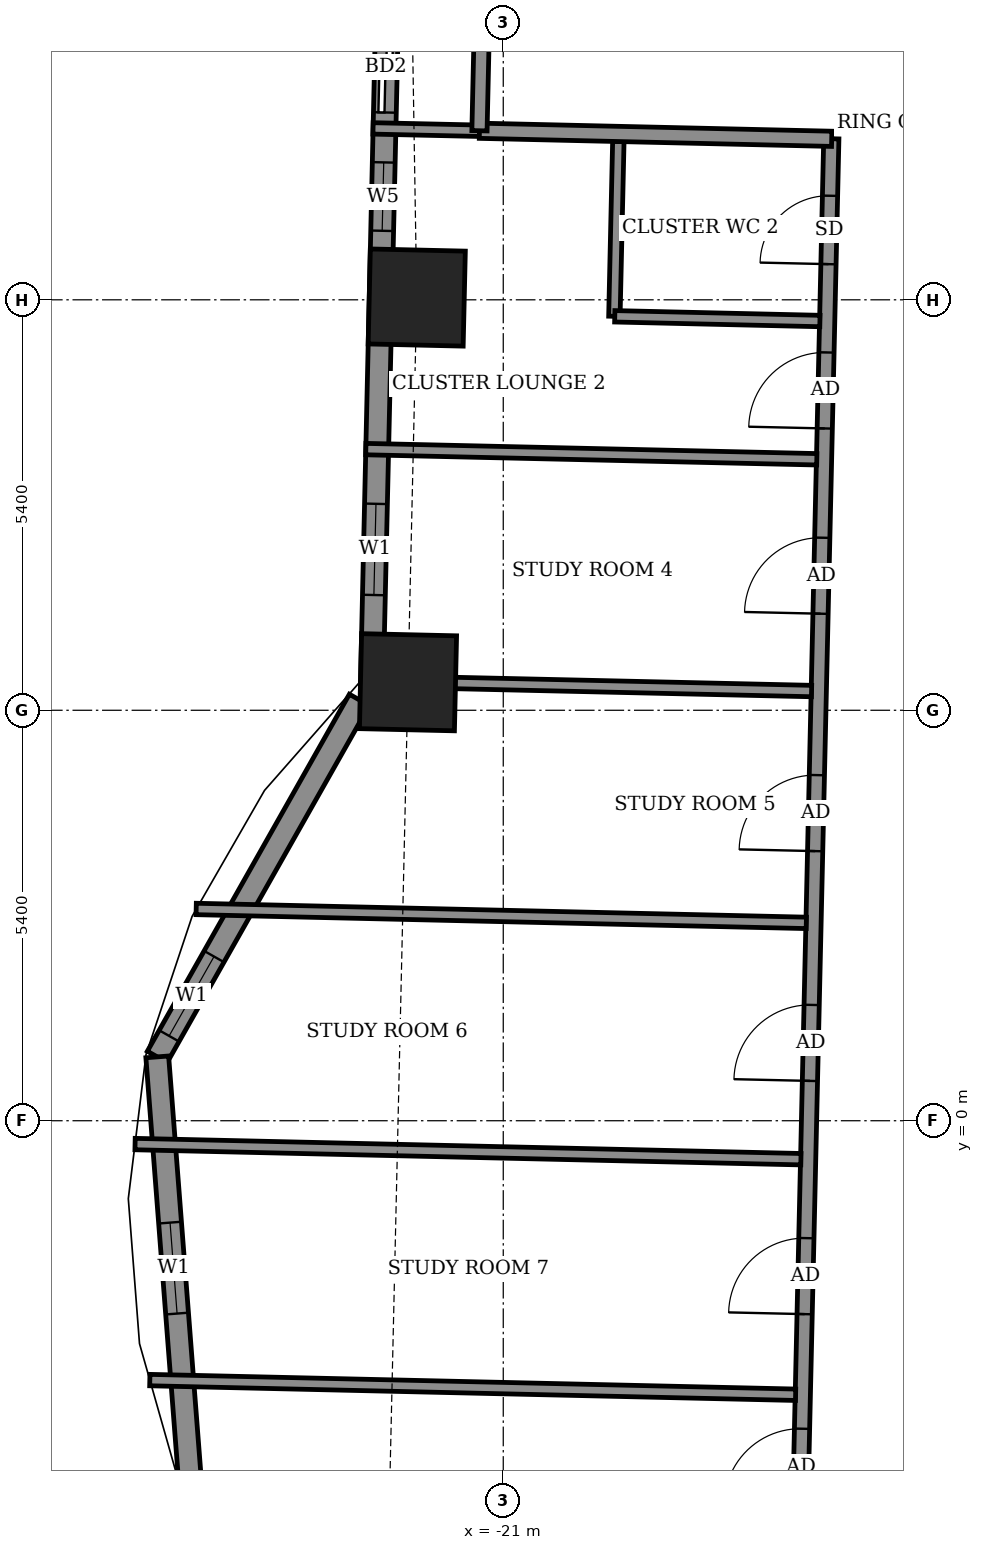
"""IFC4 building model, lengths in metres.
Left out: names, types, materials, properties, quantities, classifications, styles, units other than length and angle.
Written with IfcOpenShell. Run it as: python <this file> out.ifc"""

import sys

from ifc_helpers import new_model, si_unit, direction, frame, frame_2d, origin, origin_2d, place, context, subcontext, project, spatial, rectangle, extrude, element, fill, save


model = new_model("IFC4")
c1 = context("Model", 3, precision=1e-05, world=origin(), true_north=direction((0.0, 1.0)))
c2 = subcontext(c1, "Body", "Model", "MODEL_VIEW")
j1 = project(units=[si_unit("LENGTHUNIT", "METRE"), si_unit("PLANEANGLEUNIT", "RADIAN")], contexts=[c1])
p1 = place(None, origin())
s1 = spatial("IfcSite", under=j1, at=p1, CompositionType="ELEMENT")
p2 = place(p1, origin())
s2 = spatial("IfcBuilding", under=s1, at=p2, CompositionType="ELEMENT")
p3 = place(p2, frame((0.0, 0.0, 152.7)))
s3 = spatial("IfcBuildingStorey", under=s2, at=p3, CompositionType="ELEMENT", Elevation=152.7)
for number, where, z_axis, x_axis in (
    (1, (-22.138, 10.83, -0.55), (0.0, 0.0, 1.0), (-0.023, -1.0, 0.0)),
    (2, (-22.253, 5.769, -0.55), (0.0, 0.0, 1.0), (-0.023, -1.0, 0.0)),
):
    element("IfcColumn", number, at=place(p3, frame(where, z_axis=z_axis, x_axis=x_axis)), inside=s3, PredefinedType="COLUMN", context=c2, shape_type="SweptSolid", body=[
        extrude(rectangle(XDim=1.25, YDim=1.25, at=origin_2d()), origin(), (0.0, 0.0, 1.0), 3.6),
    ])
p4 = place(p3, frame((-22.501, 15.751, 0.0), z_axis=(0.0, 0.0, 1.0), x_axis=(-0.022737995473, -0.999741458359, 0.0)))
e3 = element("IfcWall", 3, at=p4, inside=s3, PredefinedType="SOLIDWALL", context=c2, shape_type="SweptSolid", body=[
    extrude(rectangle(XDim=10.029, YDim=0.3, at=frame_2d((5.014, 0.0))), origin(), (0.0, 0.0, 1.0), 3.05),
])
p5 = place(p4, frame((1.287, 0.0, 0.0)))
e4 = element("IfcOpeningElement", 4, at=p5, cuts=e3, PredefinedType="OPENING", context=c2, shape_type="SweptSolid", body=[
    extrude(rectangle(XDim=1.2, YDim=2.4, at=frame_2d((0.6, 1.2))), frame((0.0, 0.16, 0.0), z_axis=(0.0, -1.0, 0.0), x_axis=(1.0, 0.0, 0.0)), (0.0, 0.0, 1.0), 0.32),
])
p6 = place(p4, frame((3.144, 0.0, 0.9)))
e5 = element("IfcOpeningElement", 5, at=p6, cuts=e3, PredefinedType="OPENING", context=c2, shape_type="SweptSolid", body=[
    extrude(rectangle(XDim=0.9, YDim=1.5, at=frame_2d((0.45, 0.75))), frame((0.0, 0.16, 0.0), z_axis=(0.0, -1.0, 0.0), x_axis=(1.0, 0.0, 0.0)), (0.0, 0.0, 1.0), 0.32),
])
p7 = place(p4, frame((7.637, 0.0, 0.9)))
e6 = element("IfcOpeningElement", 6, at=p7, cuts=e3, PredefinedType="OPENING", context=c2, shape_type="SweptSolid", body=[
    extrude(rectangle(XDim=1.2, YDim=1.5, at=frame_2d((0.6, 0.75))), frame((0.0, 0.16, 0.0), z_axis=(0.0, -1.0, 0.0), x_axis=(1.0, 0.0, 0.0)), (0.0, 0.0, 1.0), 0.32),
])
p8 = place(p3, frame((-22.894, 5.537, 0.0), z_axis=(0.0, 0.0, 1.0), x_axis=(-0.492495436053, -0.870315026566, 0.0)))
e7 = element("IfcWall", 7, at=p8, inside=s3, PredefinedType="SOLIDWALL", context=c2, shape_type="SweptSolid", body=[
    extrude(rectangle(XDim=5.397, YDim=0.3, at=frame_2d((2.698, 0.0))), origin(), (0.0, 0.0, 1.0), 3.05),
])
p9 = place(p8, frame((3.88, 0.0, 0.9)))
e8 = element("IfcOpeningElement", 8, at=p9, cuts=e7, PredefinedType="OPENING", context=c2, shape_type="SweptSolid", body=[
    extrude(rectangle(XDim=1.2, YDim=1.5, at=frame_2d((0.6, 0.75))), frame((0.0, 0.16, 0.0), z_axis=(0.0, -1.0, 0.0), x_axis=(1.0, 0.0, 0.0)), (0.0, 0.0, 1.0), 0.32),
])
p10 = place(p3, frame((-25.552, 0.84, 0.0), z_axis=(0.0, 0.0, 1.0), x_axis=(0.076961115238, -0.997034095075, 0.0)))
e9 = element("IfcWall", 9, at=p10, inside=s3, PredefinedType="SOLIDWALL", context=c2, shape_type="SweptSolid", body=[
    extrude(rectangle(XDim=5.574, YDim=0.3, at=frame_2d((2.787, 0.0))), origin(), (0.0, 0.0, 1.0), 3.05),
])
p11 = place(p10, frame((2.187, 0.0, 0.9)))
e10 = element("IfcOpeningElement", 10, at=p11, cuts=e9, PredefinedType="OPENING", context=c2, shape_type="SweptSolid", body=[
    extrude(rectangle(XDim=1.2, YDim=1.5, at=frame_2d((0.6, 0.75))), frame((0.0, 0.16, 0.0), z_axis=(0.0, -1.0, 0.0), x_axis=(1.0, 0.0, 0.0)), (0.0, 0.0, 1.0), 0.32),
])
p12 = place(p3, frame((-25.486, 6.092, 0.0), z_axis=(0.0, 0.0, 1.0), x_axis=(0.022744303924, 0.999741314861, 0.0)))
e11 = element("IfcWall", 11, at=p12, inside=s3, PredefinedType="USERDEFINED", context=c2, shape_type="SweptSolid", body=[
    extrude(rectangle(XDim=3.875, YDim=0.55, at=frame_2d((1.938, 0.0))), origin(), (0.0, 0.0, 1.0), 0.8),
])
p13 = place(p3, frame((-17.32, -15.098, 0.0), z_axis=(0.0, 0.0, 1.0), x_axis=(0.022694293906, 0.999742451346, 0.0)))
e12 = element("IfcWall", 12, at=p13, inside=s3, PredefinedType="PARTITIONING", context=c2, shape_type="SweptSolid", body=[
    extrude(rectangle(XDim=28.024, YDim=0.2, at=frame_2d((14.012, 0.0))), origin(), (0.0, 0.0, 1.0), 3.05),
])
p14 = place(p13, frame((24.212, 0.0, 0.0)))
e13 = element("IfcOpeningElement", 13, at=p14, cuts=e12, PredefinedType="OPENING", context=c2, shape_type="SweptSolid", body=[
    extrude(rectangle(XDim=1.0, YDim=2.1, at=frame_2d((0.5, 1.05))), frame((0.0, 0.11, 0.0), z_axis=(0.0, -1.0, 0.0), x_axis=(1.0, 0.0, 0.0)), (0.0, 0.0, 1.0), 0.22),
])
p15 = place(p13, frame((26.374, 0.0, 0.0)))
e14 = element("IfcOpeningElement", 14, at=p15, cuts=e12, PredefinedType="OPENING", context=c2, shape_type="SweptSolid", body=[
    extrude(rectangle(XDim=0.9, YDim=2.1, at=frame_2d((0.45, 1.05))), frame((0.0, 0.11, 0.0), z_axis=(0.0, -1.0, 0.0), x_axis=(1.0, 0.0, 0.0)), (0.0, 0.0, 1.0), 0.22),
])
p16 = place(p13, frame((21.774, 0.0, 0.0)))
e15 = element("IfcOpeningElement", 15, at=p16, cuts=e12, PredefinedType="OPENING", context=c2, shape_type="SweptSolid", body=[
    extrude(rectangle(XDim=1.0, YDim=2.1, at=frame_2d((0.5, 1.05))), frame((0.0, 0.11, 0.0), z_axis=(0.0, -1.0, 0.0), x_axis=(1.0, 0.0, 0.0)), (0.0, 0.0, 1.0), 0.22),
])
p17 = place(p13, frame((18.65, 0.0, 0.0)))
e16 = element("IfcOpeningElement", 16, at=p17, cuts=e12, PredefinedType="OPENING", context=c2, shape_type="SweptSolid", body=[
    extrude(rectangle(XDim=1.0, YDim=2.1, at=frame_2d((0.5, 1.05))), frame((0.0, 0.11, 0.0), z_axis=(0.0, -1.0, 0.0), x_axis=(1.0, 0.0, 0.0)), (0.0, 0.0, 1.0), 0.22),
])
p18 = place(p13, frame((15.626, 0.0, 0.0)))
e17 = element("IfcOpeningElement", 17, at=p18, cuts=e12, PredefinedType="OPENING", context=c2, shape_type="SweptSolid", body=[
    extrude(rectangle(XDim=1.0, YDim=2.1, at=frame_2d((0.5, 1.05))), frame((0.0, 0.11, 0.0), z_axis=(0.0, -1.0, 0.0), x_axis=(1.0, 0.0, 0.0)), (0.0, 0.0, 1.0), 0.22),
])
p19 = place(p13, frame((12.557, 0.0, 0.0)))
e18 = element("IfcOpeningElement", 18, at=p19, cuts=e12, PredefinedType="OPENING", context=c2, shape_type="SweptSolid", body=[
    extrude(rectangle(XDim=1.0, YDim=2.1, at=frame_2d((0.5, 1.05))), frame((0.0, 0.11, 0.0), z_axis=(0.0, -1.0, 0.0), x_axis=(1.0, 0.0, 0.0)), (0.0, 0.0, 1.0), 0.22),
])
p20 = place(p13, frame((10.049, 0.0, 0.0)))
e19 = element("IfcOpeningElement", 19, at=p20, cuts=e12, PredefinedType="OPENING", context=c2, shape_type="SweptSolid", body=[
    extrude(rectangle(XDim=1.0, YDim=2.1, at=frame_2d((0.5, 1.05))), frame((0.0, 0.11, 0.0), z_axis=(0.0, -1.0, 0.0), x_axis=(1.0, 0.0, 0.0)), (0.0, 0.0, 1.0), 0.22),
])
p21 = place(p13, frame((7.849, 0.0, 0.0)))
e20 = element("IfcOpeningElement", 20, at=p21, cuts=e12, PredefinedType="OPENING", context=c2, shape_type="SweptSolid", body=[
    extrude(rectangle(XDim=0.9, YDim=2.1, at=frame_2d((0.45, 1.05))), frame((0.0, 0.11, 0.0), z_axis=(0.0, -1.0, 0.0), x_axis=(1.0, 0.0, 0.0)), (0.0, 0.0, 1.0), 0.22),
])
p22 = place(p13, frame((4.199, 0.0, 0.0)))
e21 = element("IfcOpeningElement", 21, at=p22, cuts=e12, PredefinedType="OPENING", context=c2, shape_type="SweptSolid", body=[
    extrude(rectangle(XDim=1.0, YDim=2.1, at=frame_2d((0.5, 1.05))), frame((0.0, 0.11, 0.0), z_axis=(0.0, -1.0, 0.0), x_axis=(1.0, 0.0, 0.0)), (0.0, 0.0, 1.0), 0.22),
])
p23 = place(p13, frame((0.75, 0.0, 0.0)))
e22 = element("IfcOpeningElement", 22, at=p23, cuts=e12, PredefinedType="OPENING", context=c2, shape_type="SweptSolid", body=[
    extrude(rectangle(XDim=0.9, YDim=2.1, at=frame_2d((0.45, 1.05))), frame((0.0, 0.11, 0.0), z_axis=(0.0, -1.0, 0.0), x_axis=(1.0, 0.0, 0.0)), (0.0, 0.0, 1.0), 0.22),
])
p24 = place(p3, frame((-25.65, -3.412, 0.0), z_axis=(0.0, 0.0, 1.0), x_axis=(0.999742413658, -0.022695954102, 0.0)))
e23 = element("IfcWall", 23, at=p24, inside=s3, PredefinedType="PARTITIONING", context=c2, shape_type="SweptSolid", body=[
    extrude(rectangle(XDim=8.498, YDim=0.15, at=frame_2d((4.249, 0.0))), origin(), (0.0, 0.0, 1.0), 2.05),
])
p25 = place(p3, frame((-25.844, -0.307, 0.0), z_axis=(0.0, 0.0, 1.0), x_axis=(0.999741504596, -0.022735962424, 0.0)))
e24 = element("IfcWall", 24, at=p25, inside=s3, PredefinedType="PARTITIONING", context=c2, shape_type="SweptSolid", body=[
    extrude(rectangle(XDim=8.762, YDim=0.15, at=frame_2d((4.381, 0.0))), origin(), (0.0, 0.0, 1.0), 2.05),
])
p26 = place(p3, frame((-25.04, 2.786, 0.0), z_axis=(0.0, 0.0, 1.0), x_axis=(0.999740625399, -0.022774589508, 0.0)))
e25 = element("IfcWall", 25, at=p26, inside=s3, PredefinedType="PARTITIONING", context=c2, shape_type="SweptSolid", body=[
    extrude(rectangle(XDim=8.029, YDim=0.15, at=frame_2d((4.015, 0.0))), origin(), (0.0, 0.0, 1.0), 2.05),
])
p27 = place(p3, frame((-22.578, 5.78, 0.0), z_axis=(0.0, 0.0, 1.0), x_axis=(0.999746200787, -0.022528515532, 0.0)))
e26 = element("IfcWall", 26, at=p27, inside=s3, PredefinedType="PARTITIONING", context=c2, shape_type="SweptSolid", body=[
    extrude(rectangle(XDim=5.635, YDim=0.15, at=frame_2d((2.818, 0.0))), origin(), (0.0, 0.0, 1.0), 3.05),
])
p28 = place(p3, frame((-22.808, 8.836, 0.0), z_axis=(0.0, 0.0, 1.0), x_axis=(0.999744927012, -0.022584970987, 0.0)))
e27 = element("IfcWall", 27, at=p28, inside=s3, PredefinedType="PARTITIONING", context=c2, shape_type="SweptSolid", body=[
    extrude(rectangle(XDim=5.935, YDim=0.15, at=frame_2d((2.967, 0.0))), origin(), (0.0, 0.0, 1.0), 2.55),
])
p29 = place(p3, frame((-19.538, 10.583, 0.0), z_axis=(0.0, 0.0, 1.0), x_axis=(0.022612884682, 0.999744296031, 0.0)))
e28 = element("IfcWall", 28, at=p29, inside=s3, PredefinedType="PARTITIONING", context=c2, shape_type="SweptSolid", body=[
    extrude(rectangle(XDim=2.3, YDim=0.15, at=frame_2d((1.15, 0.0))), origin(), (0.0, 0.0, 1.0), 3.05),
])
p30 = place(p3, frame((-19.533, 10.583, 0.0), z_axis=(0.0, 0.0, 1.0), x_axis=(0.999736155505, -0.022969966847, 0.0)))
e29 = element("IfcWall", 29, at=p30, inside=s3, PredefinedType="PARTITIONING", context=c2, shape_type="SweptSolid", body=[
    extrude(rectangle(XDim=2.7, YDim=0.15, at=frame_2d((1.35, 0.0))), origin(), (0.0, 0.0, 1.0), 3.05),
])
p31 = place(p3, frame((-22.713, 13.055, 0.0), z_axis=(0.0, 0.0, 1.0), x_axis=(0.999756172383, -0.022081571112, 0.0)))
e30 = element("IfcWall", 30, at=p31, inside=s3, PredefinedType="PARTITIONING", context=c2, shape_type="SweptSolid", body=[
    extrude(rectangle(XDim=1.404, YDim=0.15, at=frame_2d((0.702, 0.0))), origin(), (0.0, 0.0, 1.0), 2.55),
])
p32 = place(p3, frame((-21.313, 13.024, 0.0), z_axis=(0.0, 0.0, 1.0), x_axis=(0.999738699021, -0.022858995594, 0.0)))
e31 = element("IfcWall", 31, at=p32, inside=s3, PredefinedType="PARTITIONING", context=c2, shape_type="SweptSolid", body=[
    extrude(rectangle(XDim=4.635, YDim=0.2, at=frame_2d((2.318, 0.0))), origin(), (0.0, 0.0, 1.0), 3.05),
])
p33 = place(p3, frame((-21.313, 13.024, 0.0), z_axis=(0.0, 0.0, 1.0), x_axis=(0.022632637625, 0.99974384905, 0.0)))
e32 = element("IfcWall", 32, at=p33, inside=s3, PredefinedType="PARTITIONING", context=c2, shape_type="SweptSolid", body=[
    extrude(rectangle(XDim=1.5, YDim=0.2, at=frame_2d((0.75, 0.0))), origin(), (0.0, 0.0, 1.0), 3.05),
])
p34 = place(p3, frame((-21.279, 14.523, 0.0), z_axis=(0.0, 0.0, 1.0), x_axis=(0.999742669174, -0.02268469602, 0.0)))
e33 = element("IfcWall", 33, at=p34, inside=s3, PredefinedType="PARTITIONING", context=c2, shape_type="SweptSolid", body=[
    extrude(rectangle(XDim=40.639, YDim=0.2, at=frame_2d((20.319, 0.0))), origin(), (0.0, 0.0, 1.0), 3.05),
])
p35 = place(p34, frame((37.65, 0.0, 0.0)))
e34 = element("IfcOpeningElement", 34, at=p35, cuts=e33, PredefinedType="OPENING", context=c2, shape_type="SweptSolid", body=[
    extrude(rectangle(XDim=0.9, YDim=2.1, at=frame_2d((0.45, 1.05))), frame((0.0, 0.11, 0.0), z_axis=(0.0, -1.0, 0.0), x_axis=(1.0, 0.0, 0.0)), (0.0, 0.0, 1.0), 0.22),
])
p36 = place(p34, frame((32.775, 0.0, 0.0)))
e35 = element("IfcOpeningElement", 35, at=p36, cuts=e33, PredefinedType="OPENING", context=c2, shape_type="SweptSolid", body=[
    extrude(rectangle(XDim=0.9, YDim=2.1, at=frame_2d((0.45, 1.05))), frame((0.0, 0.11, 0.0), z_axis=(0.0, -1.0, 0.0), x_axis=(1.0, 0.0, 0.0)), (0.0, 0.0, 1.0), 0.22),
])
p37 = place(p34, frame((30.4, 0.0, 0.0)))
e36 = element("IfcOpeningElement", 36, at=p37, cuts=e33, PredefinedType="OPENING", context=c2, shape_type="SweptSolid", body=[
    extrude(rectangle(XDim=0.9, YDim=2.1, at=frame_2d((0.45, 1.05))), frame((0.0, 0.11, 0.0), z_axis=(0.0, -1.0, 0.0), x_axis=(1.0, 0.0, 0.0)), (0.0, 0.0, 1.0), 0.22),
])
p38 = place(p34, frame((23.225, 0.0, 0.0)))
e37 = element("IfcOpeningElement", 37, at=p38, cuts=e33, PredefinedType="OPENING", context=c2, shape_type="SweptSolid", body=[
    extrude(rectangle(XDim=0.9, YDim=2.1, at=frame_2d((0.45, 1.05))), frame((0.0, 0.11, 0.0), z_axis=(0.0, -1.0, 0.0), x_axis=(1.0, 0.0, 0.0)), (0.0, 0.0, 1.0), 0.22),
])
p39 = place(p34, frame((20.85, 0.0, 0.0)))
e38 = element("IfcOpeningElement", 38, at=p39, cuts=e33, PredefinedType="OPENING", context=c2, shape_type="SweptSolid", body=[
    extrude(rectangle(XDim=0.9, YDim=2.1, at=frame_2d((0.45, 1.05))), frame((0.0, 0.11, 0.0), z_axis=(0.0, -1.0, 0.0), x_axis=(1.0, 0.0, 0.0)), (0.0, 0.0, 1.0), 0.22),
])
p40 = place(p34, frame((13.675, 0.0, 0.0)))
e39 = element("IfcOpeningElement", 39, at=p40, cuts=e33, PredefinedType="OPENING", context=c2, shape_type="SweptSolid", body=[
    extrude(rectangle(XDim=0.9, YDim=2.1, at=frame_2d((0.45, 1.05))), frame((0.0, 0.11, 0.0), z_axis=(0.0, -1.0, 0.0), x_axis=(1.0, 0.0, 0.0)), (0.0, 0.0, 1.0), 0.22),
])
p41 = place(p34, frame((11.325, 0.0, 0.0)))
e40 = element("IfcOpeningElement", 40, at=p41, cuts=e33, PredefinedType="OPENING", context=c2, shape_type="SweptSolid", body=[
    extrude(rectangle(XDim=0.9, YDim=2.1, at=frame_2d((0.45, 1.05))), frame((0.0, 0.11, 0.0), z_axis=(0.0, -1.0, 0.0), x_axis=(1.0, 0.0, 0.0)), (0.0, 0.0, 1.0), 0.22),
])
p42 = place(p34, frame((1.6, 0.0, 0.0)))
e41 = element("IfcOpeningElement", 41, at=p42, cuts=e33, PredefinedType="OPENING", context=c2, shape_type="SweptSolid", body=[
    extrude(rectangle(XDim=1.0, YDim=2.1, at=frame_2d((0.5, 1.05))), frame((0.0, 0.11, 0.0), z_axis=(0.0, -1.0, 0.0), x_axis=(1.0, 0.0, 0.0)), (0.0, 0.0, 1.0), 0.22),
])
p43 = place(p34, frame((6.55, 0.0, 0.0)))
e42 = element("IfcOpeningElement", 42, at=p43, cuts=e33, PredefinedType="OPENING", context=c2, shape_type="SweptSolid", body=[
    extrude(rectangle(XDim=0.9, YDim=2.1, at=frame_2d((0.45, 1.05))), frame((0.0, 0.11, 0.0), z_axis=(0.0, -1.0, 0.0), x_axis=(1.0, 0.0, 0.0)), (0.0, 0.0, 1.0), 0.22),
])
p44 = place(p5, origin())
e43 = element("IfcDoor", 43, at=p44, inside=s3, OperationType="SLIDING_TO_LEFT", PredefinedType="DOOR", context=c2, shape_type="SweptSolid", body=[
    extrude(rectangle(XDim=1.2, YDim=2.4, at=frame_2d((0.6, 1.2))), frame((0.0, 0.025, 0.0), z_axis=(0.0, -1.0, 0.0), x_axis=(1.0, 0.0, 0.0)), (0.0, 0.0, 1.0), 0.05),
])
fill(e4, e43)
p45 = place(p6, origin())
e44 = element("IfcWindow", 44, at=p45, inside=s3, PartitioningType="SINGLE_PANEL", PredefinedType="WINDOW", context=c2, shape_type="SweptSolid", body=[
    extrude(rectangle(XDim=0.9, YDim=1.5, at=frame_2d((0.45, 0.75))), frame((0.0, 0.03, 0.0), z_axis=(0.0, -1.0, 0.0), x_axis=(1.0, 0.0, 0.0)), (0.0, 0.0, 1.0), 0.06),
])
fill(e5, e44)
p46 = place(p7, origin())
e45 = element("IfcWindow", 45, at=p46, inside=s3, PartitioningType="SINGLE_PANEL", PredefinedType="WINDOW", context=c2, shape_type="SweptSolid", body=[
    extrude(rectangle(XDim=1.2, YDim=1.5, at=frame_2d((0.6, 0.75))), frame((0.0, 0.03, 0.0), z_axis=(0.0, -1.0, 0.0), x_axis=(1.0, 0.0, 0.0)), (0.0, 0.0, 1.0), 0.06),
])
fill(e6, e45)
p47 = place(p9, origin())
e46 = element("IfcWindow", 46, at=p47, inside=s3, PartitioningType="SINGLE_PANEL", PredefinedType="WINDOW", context=c2, shape_type="SweptSolid", body=[
    extrude(rectangle(XDim=1.2, YDim=1.5, at=frame_2d((0.6, 0.75))), frame((0.0, 0.03, 0.0), z_axis=(0.0, -1.0, 0.0), x_axis=(1.0, 0.0, 0.0)), (0.0, 0.0, 1.0), 0.06),
])
fill(e8, e46)
p48 = place(p11, origin())
e47 = element("IfcWindow", 47, at=p48, inside=s3, PartitioningType="SINGLE_PANEL", PredefinedType="WINDOW", context=c2, shape_type="SweptSolid", body=[
    extrude(rectangle(XDim=1.2, YDim=1.5, at=frame_2d((0.6, 0.75))), frame((0.0, 0.03, 0.0), z_axis=(0.0, -1.0, 0.0), x_axis=(1.0, 0.0, 0.0)), (0.0, 0.0, 1.0), 0.06),
])
fill(e10, e47)
p49 = place(p14, origin())
e48 = element("IfcDoor", 48, at=p49, inside=s3, OperationType="SINGLE_SWING_LEFT", PredefinedType="DOOR", context=c2, shape_type="SweptSolid", body=[
    extrude(rectangle(XDim=1.0, YDim=2.1, at=frame_2d((0.5, 1.05))), frame((0.0, 0.025, 0.0), z_axis=(0.0, -1.0, 0.0), x_axis=(1.0, 0.0, 0.0)), (0.0, 0.0, 1.0), 0.05),
])
fill(e13, e48)
p50 = place(p15, origin())
e49 = element("IfcDoor", 49, at=p50, inside=s3, OperationType="SINGLE_SWING_LEFT", PredefinedType="DOOR", context=c2, shape_type="SweptSolid", body=[
    extrude(rectangle(XDim=0.9, YDim=2.1, at=frame_2d((0.45, 1.05))), frame((0.0, 0.025, 0.0), z_axis=(0.0, -1.0, 0.0), x_axis=(1.0, 0.0, 0.0)), (0.0, 0.0, 1.0), 0.05),
])
fill(e14, e49)
p51 = place(p16, origin())
e50 = element("IfcDoor", 50, at=p51, inside=s3, OperationType="SINGLE_SWING_RIGHT", PredefinedType="DOOR", context=c2, shape_type="SweptSolid", body=[
    extrude(rectangle(XDim=1.0, YDim=2.1, at=frame_2d((0.5, 1.05))), frame((0.0, 0.025, 0.0), z_axis=(0.0, -1.0, 0.0), x_axis=(1.0, 0.0, 0.0)), (0.0, 0.0, 1.0), 0.05),
])
fill(e15, e50)
p52 = place(p17, origin())
e51 = element("IfcDoor", 51, at=p52, inside=s3, OperationType="SINGLE_SWING_LEFT", PredefinedType="DOOR", context=c2, shape_type="SweptSolid", body=[
    extrude(rectangle(XDim=1.0, YDim=2.1, at=frame_2d((0.5, 1.05))), frame((0.0, 0.025, 0.0), z_axis=(0.0, -1.0, 0.0), x_axis=(1.0, 0.0, 0.0)), (0.0, 0.0, 1.0), 0.05),
])
fill(e16, e51)
p53 = place(p18, origin())
e52 = element("IfcDoor", 52, at=p53, inside=s3, OperationType="SINGLE_SWING_RIGHT", PredefinedType="DOOR", context=c2, shape_type="SweptSolid", body=[
    extrude(rectangle(XDim=1.0, YDim=2.1, at=frame_2d((0.5, 1.05))), frame((0.0, 0.025, 0.0), z_axis=(0.0, -1.0, 0.0), x_axis=(1.0, 0.0, 0.0)), (0.0, 0.0, 1.0), 0.05),
])
fill(e17, e52)
p54 = place(p19, origin())
e53 = element("IfcDoor", 53, at=p54, inside=s3, OperationType="SINGLE_SWING_LEFT", PredefinedType="DOOR", context=c2, shape_type="SweptSolid", body=[
    extrude(rectangle(XDim=1.0, YDim=2.1, at=frame_2d((0.5, 1.05))), frame((0.0, 0.025, 0.0), z_axis=(0.0, -1.0, 0.0), x_axis=(1.0, 0.0, 0.0)), (0.0, 0.0, 1.0), 0.05),
])
fill(e18, e53)
p55 = place(p20, origin())
e54 = element("IfcDoor", 54, at=p55, inside=s3, OperationType="SINGLE_SWING_RIGHT", PredefinedType="DOOR", context=c2, shape_type="SweptSolid", body=[
    extrude(rectangle(XDim=1.0, YDim=2.1, at=frame_2d((0.5, 1.05))), frame((0.0, 0.025, 0.0), z_axis=(0.0, -1.0, 0.0), x_axis=(1.0, 0.0, 0.0)), (0.0, 0.0, 1.0), 0.05),
])
fill(e19, e54)
save(model, sys.argv[1])
